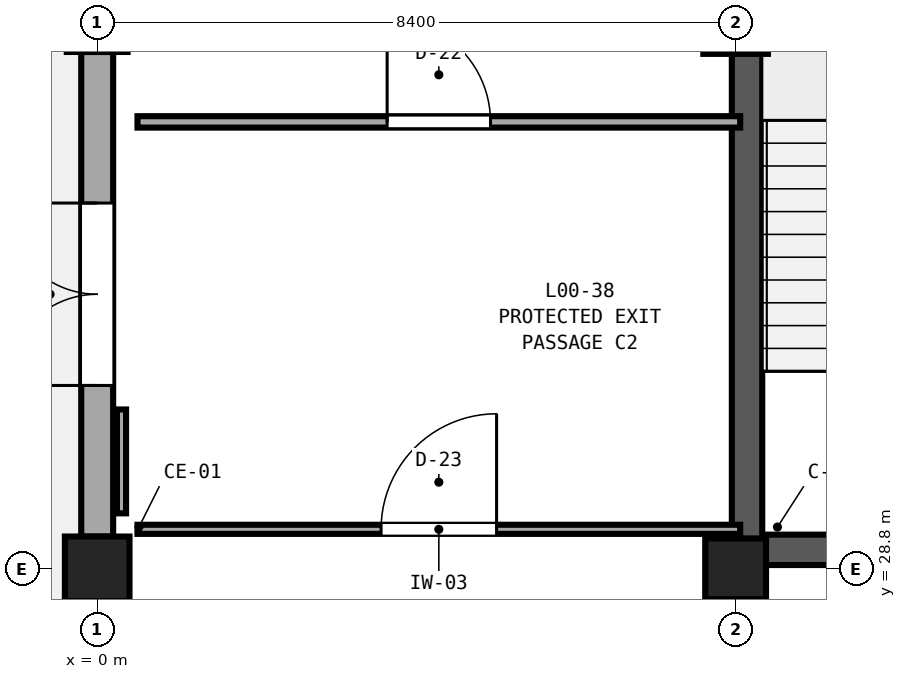
"""IFC4 building model, lengths in metres.
Left out: names, types, materials, properties, quantities, classifications, styles, units other than length and angle.
Written with IfcOpenShell. Run it as: python <this file> out.ifc"""

import sys

from ifc_helpers import new_model, si_unit, direction, frame, frame_2d, origin, origin_2d, place, context, subcontext, project, spatial, rectangle, extrude, element, fill, save


model = new_model("IFC4")
c1 = context("Model", 3, precision=1e-05, world=origin(), true_north=direction((0.0, 1.0)))
c2 = subcontext(c1, "Body", "Model", "MODEL_VIEW")
j1 = project(units=[si_unit("LENGTHUNIT", "METRE"), si_unit("PLANEANGLEUNIT", "RADIAN")], contexts=[c1])
p1 = place(None, origin())
s1 = spatial("IfcSite", under=j1, at=p1, CompositionType="ELEMENT")
p2 = place(p1, origin())
s2 = spatial("IfcBuilding", under=s1, at=p2, CompositionType="ELEMENT")
p3 = place(p2, origin())
s3 = spatial("IfcBuildingStorey", under=s2, at=p3, CompositionType="ELEMENT", Elevation=0.0)
p4 = place(p3, frame((0.0, 28.8, 0.0), z_axis=(0.0, 0.0, 1.0), x_axis=(1.0, 0.0, 0.0)))
e1 = element("IfcColumn", 1, at=p4, inside=s3, PredefinedType="COLUMN", context=c2, shape_type="SweptSolid", body=[
    extrude(rectangle(XDim=0.85, YDim=0.85, at=origin_2d()), origin(), (0.0, 0.0, 1.0), 5.4),
])
for number, where, z_axis, x_axis in (
    (2, (0.0, 36.0, 0.0), (0.0, 0.0, 1.0), (1.0, 0.0, 0.0)),
    (3, (8.4, 28.8, 0.0), (0.0, 0.0, 1.0), (1.0, 0.0, 0.0)),
):
    element("IfcColumn", number, at=place(p3, frame(where, z_axis=z_axis, x_axis=x_axis)), inside=s3, PredefinedType="COLUMN", context=c2, shape_type="SweptSolid", body=[
        extrude(rectangle(XDim=0.8, YDim=0.8, at=origin_2d()), origin(), (0.0, 0.0, 1.0), 5.4),
    ])
p5 = place(p3, frame((8.4, 36.0, 0.0), z_axis=(0.0, 0.0, 1.0), x_axis=(1.0, 0.0, 0.0)))
e4 = element("IfcColumn", 4, at=p5, inside=s3, PredefinedType="COLUMN", context=c2, shape_type="SweptSolid", body=[
    extrude(rectangle(XDim=0.85, YDim=0.85, at=origin_2d()), origin(), (0.0, 0.0, 1.0), 5.4),
])
p6 = place(p3, frame((0.0, 29.225, 0.0), z_axis=(0.0, 0.0, 1.0), x_axis=(0.0, 1.0, 0.0)))
e5 = element("IfcWall", 5, at=p6, inside=s3, PredefinedType="SOLIDWALL", context=c2, shape_type="SweptSolid", body=[
    extrude(rectangle(XDim=6.375, YDim=0.42, at=frame_2d((3.188, 0.0))), origin(), (0.0, 0.0, 1.0), 4.53),
])
p7 = place(p6, frame((1.988, 0.0, 0.0)))
e6 = element("IfcOpeningElement", 6, at=p7, cuts=e5, PredefinedType="OPENING", context=c2, shape_type="SweptSolid", body=[
    extrude(rectangle(XDim=2.4, YDim=2.6, at=frame_2d((1.2, 1.3))), frame((0.0, 0.23, 0.0), z_axis=(0.0, -1.0, 0.0), x_axis=(1.0, 0.0, 0.0)), (0.0, 0.0, 1.0), 0.46),
])
p8 = place(p3, frame((16.45, 29.05, 0.0), z_axis=(0.0, 0.0, 1.0), x_axis=(-1.0, 0.0, 0.0)))
e7 = element("IfcWall", 7, at=p8, inside=s3, PredefinedType="SHEAR", context=c2, shape_type="SweptSolid", body=[
    extrude(rectangle(XDim=7.7, YDim=0.4, at=frame_2d((3.85, 0.0))), origin(), (0.0, 0.0, 1.0), 5.4),
])
p9 = place(p8, frame((3.3, 0.0, 0.0)))
e8 = element("IfcOpeningElement", 8, at=p9, cuts=e7, PredefinedType="OPENING", context=c2, shape_type="SweptSolid", body=[
    extrude(rectangle(XDim=1.1, YDim=2.2, at=frame_2d((0.55, 1.1))), frame((0.0, 0.22, 0.0), z_axis=(0.0, -1.0, 0.0), x_axis=(1.0, 0.0, 0.0)), (0.0, 0.0, 1.0), 0.44),
])
p10 = place(p3, frame((8.55, 37.3, 0.0), z_axis=(0.0, 0.0, 1.0), x_axis=(0.0, -1.0, 0.0)))
e9 = element("IfcWall", 9, at=p10, inside=s3, PredefinedType="SHEAR", context=c2, shape_type="SweptSolid", body=[
    extrude(rectangle(XDim=8.45, YDim=0.4, at=frame_2d((4.225, 0.0))), origin(), (0.0, 0.0, 1.0), 5.4),
])
p11 = place(p3, frame((0.53, 34.68, 0.0), z_axis=(0.0, 0.0, 1.0), x_axis=(1.0, 0.0, 0.0)))
e10 = element("IfcWall", 10, at=p11, inside=s3, PredefinedType="PARTITIONING", context=c2, shape_type="SweptSolid", body=[
    extrude(rectangle(XDim=7.93, YDim=0.15, at=frame_2d((3.965, 0.0))), origin(), (0.0, 0.0, 1.0), 5.08),
])
p12 = place(p11, frame((3.285, 0.0, 0.0)))
e11 = element("IfcOpeningElement", 11, at=p12, cuts=e10, PredefinedType="OPENING", context=c2, shape_type="SweptSolid", body=[
    extrude(rectangle(XDim=1.36, YDim=2.29, at=frame_2d((0.68, 1.145))), frame((0.0, 0.095, 0.0), z_axis=(0.0, -1.0, 0.0), x_axis=(1.0, 0.0, 0.0)), (0.0, 0.0, 1.0), 0.19),
])
p13 = place(p3, frame((0.53, 29.32, 0.0), z_axis=(0.0, 0.0, 1.0), x_axis=(1.0, 0.0, 0.0)))
e12 = element("IfcWall", 12, at=p13, inside=s3, PredefinedType="PARTITIONING", context=c2, shape_type="SweptSolid", body=[
    extrude(rectangle(XDim=7.93, YDim=0.12, at=frame_2d((3.965, 0.0))), origin(), (0.0, 0.0, 1.0), 4.58),
])
p14 = place(p13, frame((3.205, 0.0, 0.0)))
e13 = element("IfcOpeningElement", 13, at=p14, cuts=e12, PredefinedType="OPENING", context=c2, shape_type="SweptSolid", body=[
    extrude(rectangle(XDim=1.52, YDim=2.29, at=frame_2d((0.76, 1.145))), frame((0.0, 0.08, 0.0), z_axis=(0.0, -1.0, 0.0), x_axis=(1.0, 0.0, 0.0)), (0.0, 0.0, 1.0), 0.16),
])
p15 = place(p3, frame((0.32, 29.53, 0.0), z_axis=(0.0, 0.0, 1.0), x_axis=(0.0, 1.0, 0.0)))
e14 = element("IfcWall", 14, at=p15, inside=s3, PredefinedType="PARTITIONING", context=c2, shape_type="SweptSolid", body=[
    extrude(rectangle(XDim=1.367, YDim=0.12, at=frame_2d((0.683, 0.0))), origin(), (0.0, 0.0, 1.0), 4.53),
])
p16 = place(p7, origin())
e15 = element("IfcDoor", 15, at=p16, inside=s3, OperationType="DOUBLE_DOOR_SINGLE_SWING", PredefinedType="DOOR", context=c2, shape_type="SweptSolid", body=[
    extrude(rectangle(XDim=2.4, YDim=2.6, at=frame_2d((1.2, 1.3))), frame((0.0, 0.025, 0.0), z_axis=(0.0, -1.0, 0.0), x_axis=(1.0, 0.0, 0.0)), (0.0, 0.0, 1.0), 0.05),
])
fill(e6, e15)
p17 = place(p12, origin())
e16 = element("IfcDoor", 16, at=p17, inside=s3, OperationType="SINGLE_SWING_LEFT", PredefinedType="DOOR", context=c2, shape_type="SweptSolid", body=[
    extrude(rectangle(XDim=1.36, YDim=2.29, at=frame_2d((0.68, 1.145))), frame((0.0, 0.025, 0.0), z_axis=(0.0, -1.0, 0.0), x_axis=(1.0, 0.0, 0.0)), (0.0, 0.0, 1.0), 0.05),
])
fill(e11, e16)
p18 = place(p14, frame((1.52, 0.0, 0.0), z_axis=(0.0, 0.0, 1.0), x_axis=(-1.0, 0.0, 0.0)))
e17 = element("IfcDoor", 17, at=p18, inside=s3, OperationType="SINGLE_SWING_RIGHT", PredefinedType="DOOR", context=c2, shape_type="SweptSolid", body=[
    extrude(rectangle(XDim=1.52, YDim=2.29, at=frame_2d((0.76, 1.145))), frame((0.0, 0.025, 0.0), z_axis=(0.0, -1.0, 0.0), x_axis=(1.0, 0.0, 0.0)), (0.0, 0.0, 1.0), 0.05),
])
fill(e13, e17)
save(model, sys.argv[1])
